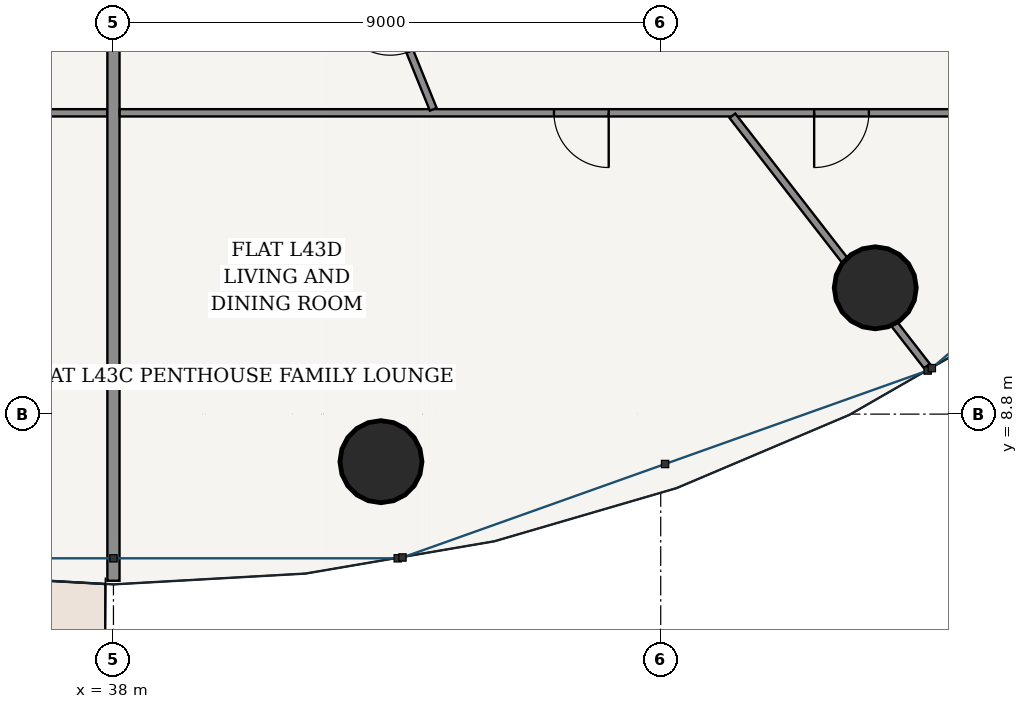
"""IFC4 building model, lengths in metres.
Left out: names, types, materials, properties, quantities, classifications, styles, units other than length and angle.
Written with IfcOpenShell. Run it as: python <this file> out.ifc"""

import sys

from ifc_helpers import new_model, si_unit, direction, frame, frame_2d, origin, origin_2d, place, context, subcontext, project, spatial, rectangle, hollow_circle, extrude, source, transform, mapped, element, fill, save


model = new_model("IFC4")
c1 = context("Model", 3, precision=1e-05, world=origin(), true_north=direction((-0.2419218956, 0.970295726276)))
c2 = subcontext(c1, "Body", "Model", "MODEL_VIEW")
j1 = project(units=[si_unit("LENGTHUNIT", "METRE"), si_unit("PLANEANGLEUNIT", "RADIAN")], contexts=[c1])
p1 = place(None, origin())
s1 = spatial("IfcSite", under=j1, at=p1, CompositionType="ELEMENT")
p2 = place(p1, origin())
s2 = spatial("IfcBuilding", under=s1, at=p2, CompositionType="ELEMENT")
p3 = place(p2, frame((0.0, 0.0, 164.2)))
s3 = spatial("IfcBuildingStorey", under=s2, at=p3, CompositionType="ELEMENT", Elevation=164.2)
for number, where, z_axis, x_axis in (
    (1, (42.399, 8.018, 0.0), (0.0, 0.0, 1.0), (1.0, 0.0, 0.0)),
    (2, (50.528, 10.877, 0.0), (0.0, 0.0, 1.0), (1.0, 0.0, 0.0)),
):
    element("IfcColumn", number, at=place(p3, frame(where, z_axis=z_axis, x_axis=x_axis)), inside=s3, PredefinedType="COLUMN", context=c2, shape_type="SweptSolid", body=[
        extrude(hollow_circle(Radius=0.675, WallThickness=0.042, at=origin_2d()), origin(), (0.0, 0.0, 1.0), 3.6),
    ])
p4 = place(p3, frame((37.898, 13.755, 0.0), z_axis=(0.0, 0.0, 1.0), x_axis=(-1.0, 0.0, 0.0)))
e3 = element("IfcWall", 3, at=p4, inside=s3, PredefinedType="PARTITIONING", context=c2, shape_type="SweptSolid", body=[
    extrude(rectangle(XDim=6.418, YDim=0.12, at=frame_2d((3.209, 0.0))), origin(), (0.0, 0.0, 1.0), 2.776),
])
p5 = place(p4, frame((1.132, 0.0, 0.0)))
e4 = element("IfcOpeningElement", 4, at=p5, cuts=e3, PredefinedType="OPENING", context=c2, shape_type="SweptSolid", body=[
    extrude(rectangle(XDim=0.9, YDim=2.15, at=frame_2d((0.45, 1.075))), frame((0.0, 0.07, 0.0), z_axis=(0.0, -1.0, 0.0), x_axis=(1.0, 0.0, 0.0)), (0.0, 0.0, 1.0), 0.14),
])
p6 = place(p3, frame((38.0, 16.515, 0.0), z_axis=(0.0, 0.0, 1.0), x_axis=(0.0, -1.0, 0.0)))
e5 = element("IfcWall", 5, at=p6, inside=s3, PredefinedType="PARTITIONING", context=c2, shape_type="SweptSolid", body=[
    extrude(rectangle(XDim=10.455, YDim=0.2, at=frame_2d((5.228, 0.0))), origin(), (0.0, 0.0, 1.0), 2.846),
])
p7 = place(p3, frame((52.045, 13.755, 0.0), z_axis=(0.0, 0.0, 1.0), x_axis=(-1.0, 0.0, 0.0)))
e6 = element("IfcWall", 6, at=p7, inside=s3, PredefinedType="PARTITIONING", context=c2, shape_type="SweptSolid", body=[
    extrude(rectangle(XDim=13.943, YDim=0.12, at=frame_2d((6.971, 0.0))), origin(), (0.0, 0.0, 1.0), 2.776),
])
p8 = place(p7, frame((5.9, 0.0, 0.0)))
e7 = element("IfcOpeningElement", 7, at=p8, cuts=e6, PredefinedType="OPENING", context=c2, shape_type="SweptSolid", body=[
    extrude(rectangle(XDim=0.9, YDim=2.15, at=frame_2d((0.45, 1.075))), frame((0.0, 0.07, 0.0), z_axis=(0.0, -1.0, 0.0), x_axis=(1.0, 0.0, 0.0)), (0.0, 0.0, 1.0), 0.14),
])
p9 = place(p7, frame((1.622, 0.0, 0.0)))
e8 = element("IfcOpeningElement", 8, at=p9, cuts=e6, PredefinedType="OPENING", context=c2, shape_type="SweptSolid", body=[
    extrude(rectangle(XDim=0.9, YDim=2.15, at=frame_2d((0.45, 1.075))), frame((0.0, 0.07, 0.0), z_axis=(0.0, -1.0, 0.0), x_axis=(1.0, 0.0, 0.0)), (0.0, 0.0, 1.0), 0.14),
])
p10 = place(p3, frame((48.179, 13.706, 0.0), z_axis=(0.0, 0.0, 1.0), x_axis=(0.613759011764, -0.789493429662, 0.0)))
e9 = element("IfcWall", 9, at=p10, inside=s3, PredefinedType="PARTITIONING", context=c2, shape_type="SweptSolid", body=[
    extrude(rectangle(XDim=5.212, YDim=0.12, at=frame_2d((2.606, 0.0))), origin(), (0.0, 0.0, 1.0), 2.776),
])
p11 = place(p3, frame((42.165, 16.515, 0.0), z_axis=(0.0, 0.0, 1.0), x_axis=(0.375386324206, -0.926868441365, 0.0)))
e10 = element("IfcWall", 10, at=p11, inside=s3, PredefinedType="PARTITIONING", context=c2, shape_type="SweptSolid", body=[
    extrude(rectangle(XDim=2.916, YDim=0.12, at=frame_2d((1.458, 0.0))), origin(), (0.0, 0.0, 1.0), 3.005),
])
p12 = place(p11, frame((1.028, 0.0, 0.0)))
e11 = element("IfcOpeningElement", 11, at=p12, cuts=e10, PredefinedType="OPENING", context=c2, shape_type="SweptSolid", body=[
    extrude(rectangle(XDim=0.86, YDim=2.15, at=frame_2d((0.43, 1.075))), frame((0.0, 0.07, 0.0), z_axis=(0.0, -1.0, 0.0), x_axis=(1.0, 0.0, 0.0)), (0.0, 0.0, 1.0), 0.14),
])
m1 = source(origin(), c2, "Body", "SweptSolid", [
    extrude(rectangle(XDim=0.9, YDim=2.15, at=frame_2d((0.45, 1.075))), frame((0.0, 0.025, 0.0), z_axis=(0.0, -1.0, 0.0), x_axis=(1.0, 0.0, 0.0)), (0.0, 0.0, 1.0), 0.05),
])
p13 = place(p8, origin())
e12 = element("IfcDoor", 12, at=p13, inside=s3, OperationType="SINGLE_SWING_LEFT", PredefinedType="DOOR", context=c2, shape_type="MappedRepresentation", body=[
    mapped(m1, transform((0.0, 0.0, 0.0), scale=1.0)),
])
fill(e7, e12)
p14 = place(p9, origin())
e13 = element("IfcDoor", 13, at=p14, inside=s3, OperationType="SINGLE_SWING_RIGHT", PredefinedType="DOOR", context=c2, shape_type="MappedRepresentation", body=[
    mapped(m1, transform((0.0, 0.0, 0.0), scale=1.0)),
])
fill(e8, e13)
save(model, sys.argv[1])
